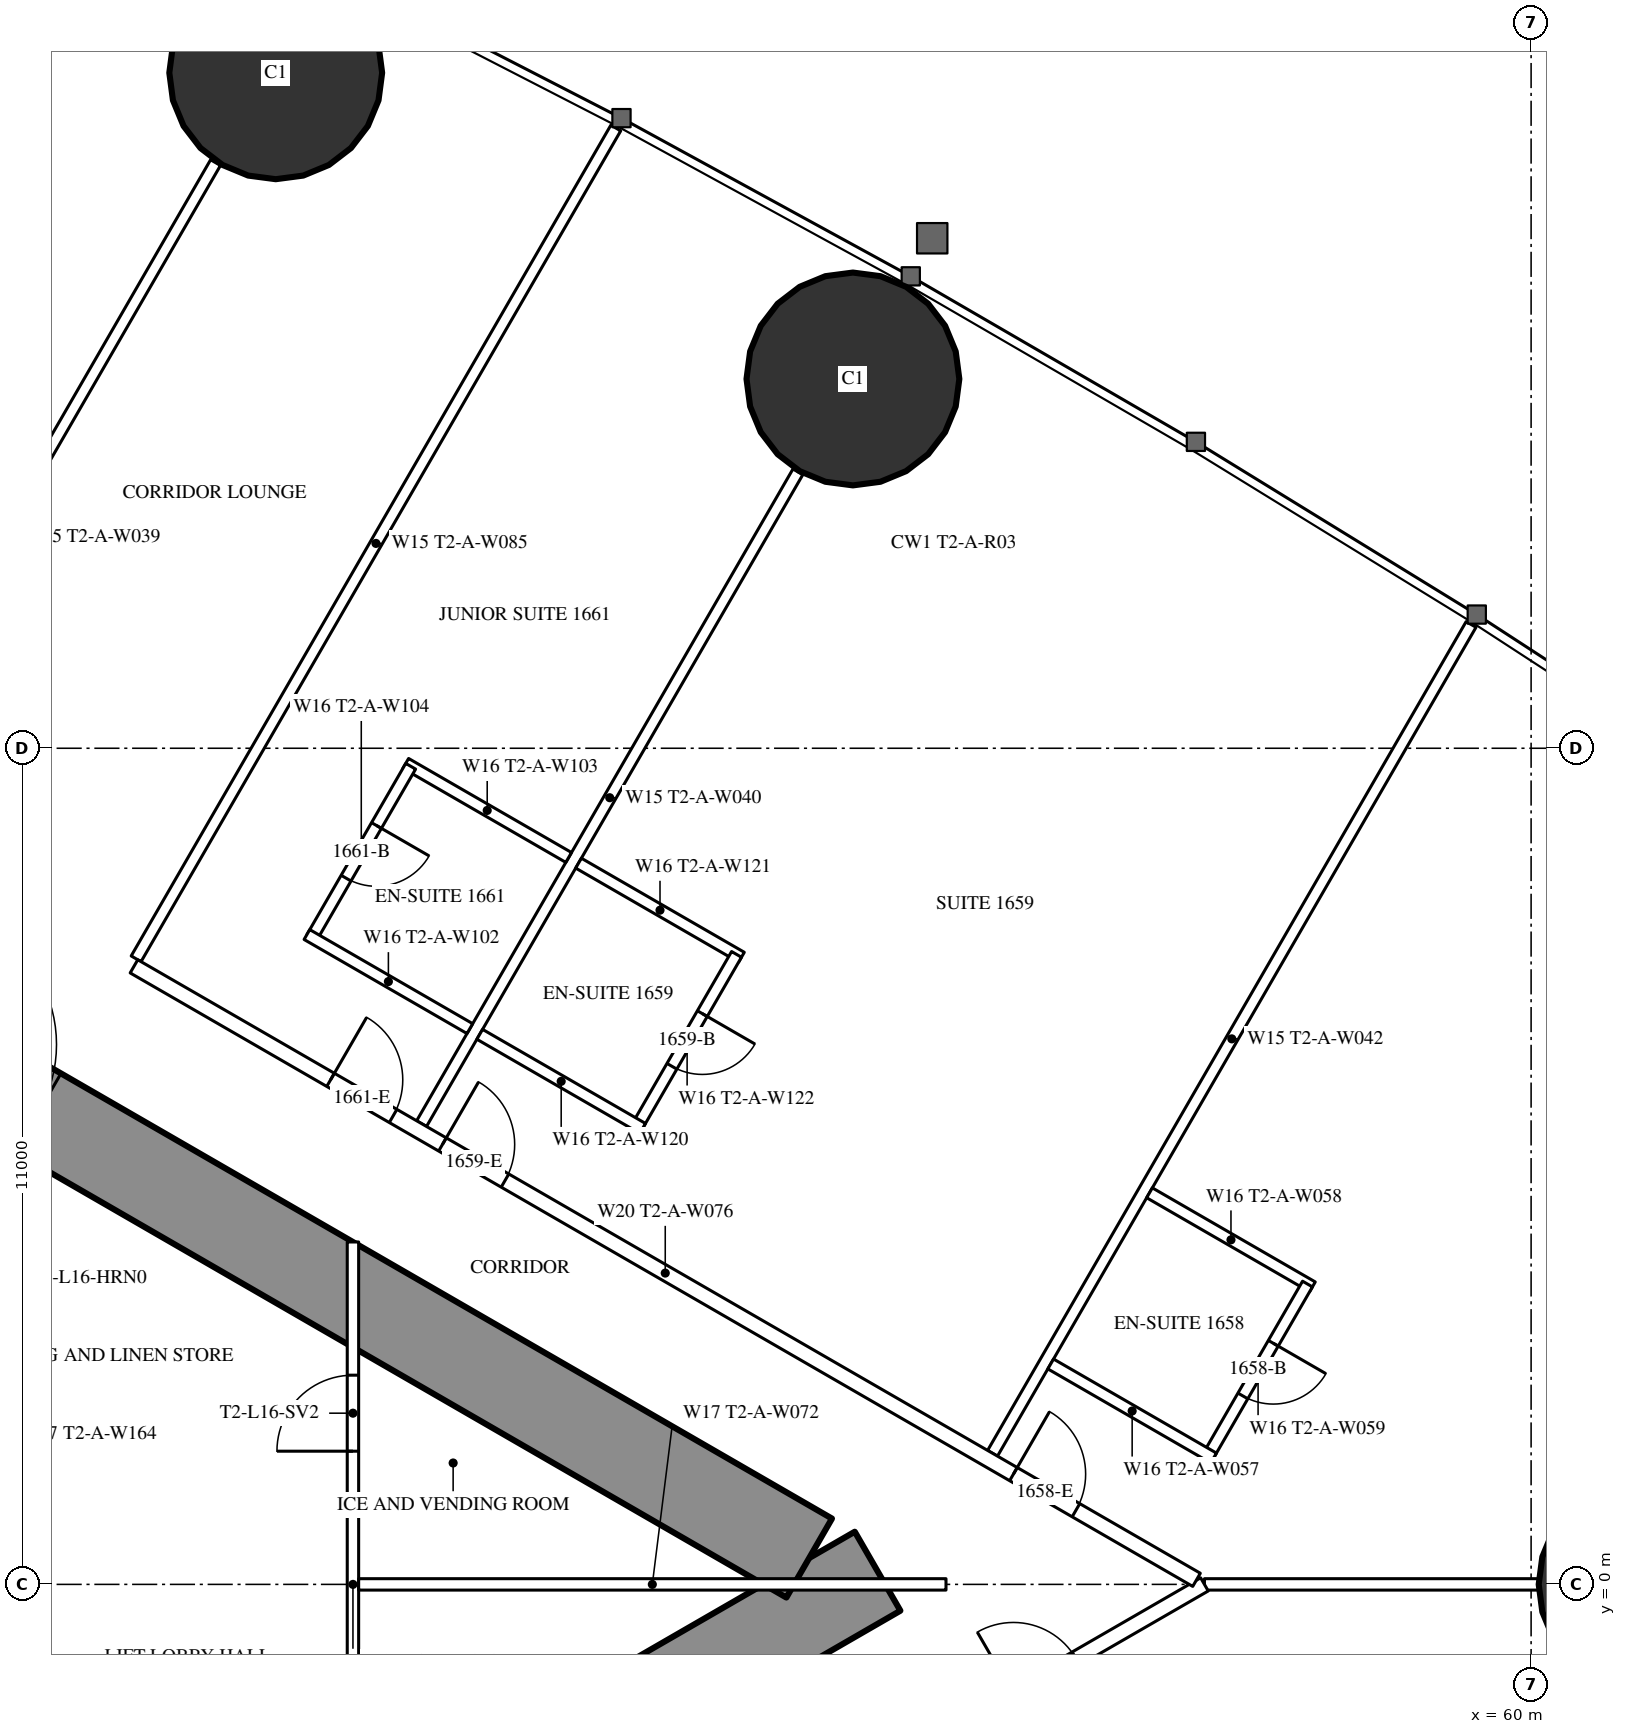
"""IFC4 building model, lengths in metres.
Left out: names, types, materials, properties, quantities, classifications, styles, units other than length and angle.
Written with IfcOpenShell. Run it as: python <this file> out.ifc"""

import sys

from ifc_helpers import new_model, si_unit, direction, frame, frame_2d, origin, origin_2d, place, context, subcontext, project, spatial, rectangle, hollow_circle, extrude, element, fill, save


model = new_model("IFC4")
c1 = context("Model", 3, precision=1e-05, world=origin(), true_north=direction((0.0, 1.0)))
c2 = subcontext(c1, "Body", "Model", "MODEL_VIEW")
j1 = project(units=[si_unit("LENGTHUNIT", "METRE"), si_unit("PLANEANGLEUNIT", "RADIAN")], contexts=[c1])
p1 = place(None, origin())
s1 = spatial("IfcSite", under=j1, at=p1, CompositionType="ELEMENT")
p2 = place(p1, origin())
s2 = spatial("IfcBuilding", under=s1, at=p2, CompositionType="ELEMENT")
p3 = place(p2, frame((0.0, 0.0, 63.5)))
s3 = spatial("IfcBuildingStorey", under=s2, at=p3, CompositionType="ELEMENT", Elevation=63.5)
for number, where, z_axis, x_axis in (
    (1, (51.078, 15.858, 0.0), (0.0, 0.0, 1.0), (1.0, 0.0, 0.0)),
    (2, (43.484, 19.886, 0.0), (0.0, 0.0, 1.0), (1.0, 0.0, 0.0)),
):
    element("IfcColumn", number, at=place(p3, frame(where, z_axis=z_axis, x_axis=x_axis)), inside=s3, PredefinedType="COLUMN", context=c2, shape_type="SweptSolid", body=[
        extrude(hollow_circle(Radius=1.4, WallThickness=0.12, at=origin_2d()), origin(), (0.0, 0.0, 1.0), 3.5),
    ])
p4 = place(p3, frame((61.5, 0.0, 0.0), z_axis=(0.0, 0.0, 1.0), x_axis=(1.0, 0.0, 0.0)))
e3 = element("IfcColumn", 3, at=p4, inside=s3, PredefinedType="COLUMN", context=c2, shape_type="SweptSolid", body=[
    extrude(hollow_circle(Radius=1.4, WallThickness=0.1, at=origin_2d()), origin(), (0.0, 0.0, 1.0), 3.5),
])
p5 = place(p3, frame((27.2, -13.8, 0.0), z_axis=(0.0, 0.0, 1.0), x_axis=(0.866027159892, 0.499996958321, 0.0)))
e4 = element("IfcWall", 4, at=p5, inside=s3, PredefinedType="SHEAR", context=c2, shape_type="SweptSolid", body=[
    extrude(rectangle(XDim=27.947, YDim=1.2, at=frame_2d((13.973, 0.0))), origin(), (0.0, 0.0, 1.0), 3.5),
])
p6 = place(p5, frame((4.6, 0.0, 0.0)))
e5 = element("IfcOpeningElement", 5, at=p6, cuts=e4, PredefinedType="OPENING", context=c2, shape_type="SweptSolid", body=[
    extrude(rectangle(XDim=1.0, YDim=2.2, at=frame_2d((0.5, 1.1))), frame((0.0, 0.61, 0.0), z_axis=(0.0, -1.0, 0.0), x_axis=(1.0, 0.0, 0.0)), (0.0, 0.0, 1.0), 1.22),
])
p7 = place(p5, frame((13.395, 0.0, 0.0)))
e6 = element("IfcOpeningElement", 6, at=p7, cuts=e4, PredefinedType="OPENING", context=c2, shape_type="SweptSolid", body=[
    extrude(rectangle(XDim=1.8, YDim=2.2, at=frame_2d((0.9, 1.1))), frame((0.0, 0.61, 0.0), z_axis=(0.0, -1.0, 0.0), x_axis=(1.0, 0.0, 0.0)), (0.0, 0.0, 1.0), 1.22),
])
p8 = place(p3, frame((27.2, 13.8, 0.0), z_axis=(0.0, 0.0, 1.0), x_axis=(0.866024515034, -0.500001539357, 0.0)))
e7 = element("IfcWall", 7, at=p8, inside=s3, PredefinedType="SHEAR", context=c2, shape_type="SweptSolid", body=[
    extrude(rectangle(XDim=26.907, YDim=1.2, at=frame_2d((13.454, 0.0))), origin(), (0.0, 0.0, 1.0), 3.5),
])
p9 = place(p8, frame((4.6, 0.0, 0.0)))
e8 = element("IfcOpeningElement", 8, at=p9, cuts=e7, PredefinedType="OPENING", context=c2, shape_type="SweptSolid", body=[
    extrude(rectangle(XDim=1.0, YDim=2.2, at=frame_2d((0.5, 1.1))), frame((0.0, 0.61, 0.0), z_axis=(0.0, -1.0, 0.0), x_axis=(1.0, 0.0, 0.0)), (0.0, 0.0, 1.0), 1.22),
])
p10 = place(p8, frame((13.395, 0.0, 0.0)))
e9 = element("IfcOpeningElement", 9, at=p10, cuts=e7, PredefinedType="OPENING", context=c2, shape_type="SweptSolid", body=[
    extrude(rectangle(XDim=1.8, YDim=2.2, at=frame_2d((0.9, 1.1))), frame((0.0, 0.61, 0.0), z_axis=(0.0, -1.0, 0.0), x_axis=(1.0, 0.0, 0.0)), (0.0, 0.0, 1.0), 1.22),
])
p11 = place(p3, frame((37.895, 10.396, 0.0), z_axis=(0.0, 0.0, 1.0), x_axis=(0.499995616528, 0.866027934568, 0.0)))
e10 = element("IfcWall", 10, at=p11, inside=s3, PredefinedType="PARTITIONING", context=c2, shape_type="SweptSolid", body=[
    extrude(rectangle(XDim=9.593, YDim=0.15, at=frame_2d((4.797, 0.0))), origin(), (0.0, 0.0, 1.0), 2.25),
])
p12 = place(p3, frame((41.647, 8.23, 0.0), z_axis=(0.0, 0.0, 1.0), x_axis=(0.49998590462, 0.866033541603, 0.0)))
e11 = element("IfcWall", 11, at=p12, inside=s3, PredefinedType="PARTITIONING", context=c2, shape_type="SweptSolid", body=[
    extrude(rectangle(XDim=12.621, YDim=0.15, at=frame_2d((6.311, 0.0))), origin(), (0.0, 0.0, 1.0), 3.25),
])
p13 = place(p3, frame((45.403, 6.062, 0.0), z_axis=(0.0, 0.0, 1.0), x_axis=(0.500013434677, 0.866017647131, 0.0)))
e12 = element("IfcWall", 12, at=p13, inside=s3, PredefinedType="PARTITIONING", context=c2, shape_type="SweptSolid", body=[
    extrude(rectangle(XDim=9.902, YDim=0.15, at=frame_2d((4.951, 0.0))), origin(), (0.0, 0.0, 1.0), 2.25),
])
p14 = place(p3, frame((52.915, 1.725, 0.0), z_axis=(0.0, 0.0, 1.0), x_axis=(0.499997163113, 0.866027041656, 0.0)))
e13 = element("IfcWall", 13, at=p14, inside=s3, PredefinedType="PARTITIONING", context=c2, shape_type="SweptSolid", body=[
    extrude(rectangle(XDim=12.591, YDim=0.15, at=frame_2d((6.295, 0.0))), origin(), (0.0, 0.0, 1.0), 3.25),
])
p15 = place(p3, frame((55.702, 0.0, 0.0), z_axis=(0.0, 0.0, 1.0), x_axis=(1.0, 0.0, 0.0)))
e14 = element("IfcWall", 14, at=p15, inside=s3, PredefinedType="PARTITIONING", context=c2, shape_type="SweptSolid", body=[
    extrude(rectangle(XDim=16.117, YDim=0.15, at=frame_2d((8.059, 0.0))), origin(), (0.0, 0.0, 1.0), 2.25),
])
p16 = place(p3, frame((37.96, -10.243, 0.0), z_axis=(0.0, 0.0, 1.0), x_axis=(0.866026429433, 0.499998223521, 0.0)))
e15 = element("IfcWall", 15, at=p16, inside=s3, PredefinedType="PARTITIONING", context=c2, shape_type="SweptSolid", body=[
    extrude(rectangle(XDim=20.487, YDim=0.2, at=frame_2d((10.243, 0.0))), origin(), (0.0, 0.0, 1.0), 3.25),
])
p17 = place(p16, frame((6.925, 0.0, 0.0)))
e16 = element("IfcOpeningElement", 16, at=p17, cuts=e15, PredefinedType="OPENING", context=c2, shape_type="SweptSolid", body=[
    extrude(rectangle(XDim=0.95, YDim=2.2, at=frame_2d((0.475, 1.1))), frame((0.0, 0.11, 0.0), z_axis=(0.0, -1.0, 0.0), x_axis=(1.0, 0.0, 0.0)), (0.0, 0.0, 1.0), 0.22),
])
p18 = place(p16, frame((8.912, 0.0, 0.0)))
e17 = element("IfcOpeningElement", 17, at=p18, cuts=e15, PredefinedType="OPENING", context=c2, shape_type="SweptSolid", body=[
    extrude(rectangle(XDim=0.95, YDim=2.2, at=frame_2d((0.475, 1.1))), frame((0.0, 0.11, 0.0), z_axis=(0.0, -1.0, 0.0), x_axis=(1.0, 0.0, 0.0)), (0.0, 0.0, 1.0), 0.22),
])
p19 = place(p16, frame((13.535, 0.0, 0.0)))
e18 = element("IfcOpeningElement", 18, at=p19, cuts=e15, PredefinedType="OPENING", context=c2, shape_type="SweptSolid", body=[
    extrude(rectangle(XDim=0.95, YDim=2.2, at=frame_2d((0.475, 1.1))), frame((0.0, 0.11, 0.0), z_axis=(0.0, -1.0, 0.0), x_axis=(1.0, 0.0, 0.0)), (0.0, 0.0, 1.0), 0.22),
])
p20 = place(p16, frame((17.585, 0.0, 0.0)))
e19 = element("IfcOpeningElement", 19, at=p20, cuts=e15, PredefinedType="OPENING", context=c2, shape_type="SweptSolid", body=[
    extrude(rectangle(XDim=0.95, YDim=2.2, at=frame_2d((0.475, 1.1))), frame((0.0, 0.11, 0.0), z_axis=(0.0, -1.0, 0.0), x_axis=(1.0, 0.0, 0.0)), (0.0, 0.0, 1.0), 0.22),
])
p21 = place(p16, frame((2.875, 0.0, 0.0)))
e20 = element("IfcOpeningElement", 20, at=p21, cuts=e15, PredefinedType="OPENING", context=c2, shape_type="SweptSolid", body=[
    extrude(rectangle(XDim=0.95, YDim=2.2, at=frame_2d((0.475, 1.1))), frame((0.0, 0.11, 0.0), z_axis=(0.0, -1.0, 0.0), x_axis=(1.0, 0.0, 0.0)), (0.0, 0.0, 1.0), 0.22),
])
p22 = place(p3, frame((41.619, 8.131, 0.0), z_axis=(0.0, 0.0, 1.0), x_axis=(0.86603245327, -0.499987789734, 0.0)))
e21 = element("IfcWall", 21, at=p22, inside=s3, PredefinedType="PARTITIONING", context=c2, shape_type="SweptSolid", body=[
    extrude(rectangle(XDim=16.142, YDim=0.2, at=frame_2d((8.071, 0.0))), origin(), (0.0, 0.0, 1.0), 3.25),
])
p23 = place(p22, frame((13.36, 0.0, 0.0)))
e22 = element("IfcOpeningElement", 22, at=p23, cuts=e21, PredefinedType="OPENING", context=c2, shape_type="SweptSolid", body=[
    extrude(rectangle(XDim=0.95, YDim=2.2, at=frame_2d((0.475, 1.1))), frame((0.0, 0.11, 0.0), z_axis=(0.0, -1.0, 0.0), x_axis=(1.0, 0.0, 0.0)), (0.0, 0.0, 1.0), 0.22),
])
p24 = place(p22, frame((4.687, 0.0, 0.0)))
e23 = element("IfcOpeningElement", 23, at=p24, cuts=e21, PredefinedType="OPENING", context=c2, shape_type="SweptSolid", body=[
    extrude(rectangle(XDim=0.95, YDim=2.2, at=frame_2d((0.475, 1.1))), frame((0.0, 0.11, 0.0), z_axis=(0.0, -1.0, 0.0), x_axis=(1.0, 0.0, 0.0)), (0.0, 0.0, 1.0), 0.22),
])
p25 = place(p22, frame((2.987, 0.0, 0.0)))
e24 = element("IfcOpeningElement", 24, at=p25, cuts=e21, PredefinedType="OPENING", context=c2, shape_type="SweptSolid", body=[
    extrude(rectangle(XDim=0.95, YDim=2.2, at=frame_2d((0.475, 1.1))), frame((0.0, 0.11, 0.0), z_axis=(0.0, -1.0, 0.0), x_axis=(1.0, 0.0, 0.0)), (0.0, 0.0, 1.0), 0.22),
])
p26 = place(p3, frame((54.98, 5.151, 0.0), z_axis=(0.0, 0.0, 1.0), x_axis=(0.86604923931, -0.499958713387, 0.0)))
e25 = element("IfcWall", 25, at=p26, inside=s3, PredefinedType="PARTITIONING", context=c2, shape_type="SweptSolid", body=[
    extrude(rectangle(XDim=2.475, YDim=0.15, at=frame_2d((1.237, 0.0))), origin(), (0.0, 0.0, 1.0), 3.25),
])
p27 = place(p3, frame((55.758, 1.7, 0.0), z_axis=(0.0, 0.0, 1.0), x_axis=(0.500006934395, 0.866021400173, 0.0)))
e26 = element("IfcWall", 26, at=p27, inside=s3, PredefinedType="PARTITIONING", context=c2, shape_type="SweptSolid", body=[
    extrude(rectangle(XDim=2.6, YDim=0.15, at=frame_2d((1.3, 0.0))), origin(), (0.0, 0.0, 1.0), 3.25),
])
p28 = place(p27, frame((0.9, 0.0, 0.0)))
e27 = element("IfcOpeningElement", 27, at=p28, cuts=e26, PredefinedType="OPENING", context=c2, shape_type="SweptSolid", body=[
    extrude(rectangle(XDim=0.8, YDim=2.2, at=frame_2d((0.4, 1.1))), frame((0.0, 0.085, 0.0), z_axis=(0.0, -1.0, 0.0), x_axis=(1.0, 0.0, 0.0)), (0.0, 0.0, 1.0), 0.17),
])
p29 = place(p3, frame((53.68, 2.9, 0.0), z_axis=(0.0, 0.0, 1.0), x_axis=(0.866006523861, -0.500032699561, 0.0)))
e28 = element("IfcWall", 28, at=p29, inside=s3, PredefinedType="PARTITIONING", context=c2, shape_type="SweptSolid", body=[
    extrude(rectangle(XDim=2.475, YDim=0.15, at=frame_2d((1.237, 0.0))), origin(), (0.0, 0.0, 1.0), 3.25),
])
p30 = place(p3, frame((47.468, 9.488, 0.0), z_axis=(0.0, 0.0, 1.0), x_axis=(0.866073894602, -0.499916002032, 0.0)))
e29 = element("IfcWall", 29, at=p30, inside=s3, PredefinedType="PARTITIONING", context=c2, shape_type="SweptSolid", body=[
    extrude(rectangle(XDim=2.475, YDim=0.15, at=frame_2d((1.238, 0.0))), origin(), (0.0, 0.0, 1.0), 3.25),
])
p31 = place(p3, frame((48.246, 6.037, 0.0), z_axis=(0.0, 0.0, 1.0), x_axis=(0.500006934395, 0.866021400173, 0.0)))
e30 = element("IfcWall", 30, at=p31, inside=s3, PredefinedType="PARTITIONING", context=c2, shape_type="SweptSolid", body=[
    extrude(rectangle(XDim=2.6, YDim=0.15, at=frame_2d((1.3, 0.0))), origin(), (0.0, 0.0, 1.0), 3.25),
])
p32 = place(p31, frame((0.9, 0.0, 0.0)))
e31 = element("IfcOpeningElement", 31, at=p32, cuts=e30, PredefinedType="OPENING", context=c2, shape_type="SweptSolid", body=[
    extrude(rectangle(XDim=0.8, YDim=2.2, at=frame_2d((0.4, 1.1))), frame((0.0, 0.085, 0.0), z_axis=(0.0, -1.0, 0.0), x_axis=(1.0, 0.0, 0.0)), (0.0, 0.0, 1.0), 0.17),
])
for number, where, z_axis, x_axis in (
    (32, (46.168, 7.237, 0.0), (0.0, 0.0, 1.0), (0.866, -0.5, 0.0)),
    (33, (45.195, 10.801, 0.0), (0.0, 0.0, 1.0), (0.866, -0.5, 0.0)),
):
    element("IfcWall", number, at=place(p3, frame(where, z_axis=z_axis, x_axis=x_axis)), inside=s3, PredefinedType="PARTITIONING", context=c2, shape_type="SweptSolid", body=[
        extrude(rectangle(XDim=2.475, YDim=0.15, at=frame_2d((1.237, 0.0))), origin(), (0.0, 0.0, 1.0), 3.25),
    ])
p33 = place(p3, frame((43.959, 8.512, 0.0), z_axis=(0.0, 0.0, 1.0), x_axis=(0.500006934395, 0.866021400173, 0.0)))
e34 = element("IfcWall", 34, at=p33, inside=s3, PredefinedType="PARTITIONING", context=c2, shape_type="SweptSolid", body=[
    extrude(rectangle(XDim=2.6, YDim=0.15, at=frame_2d((1.3, 0.0))), origin(), (0.0, 0.0, 1.0), 3.25),
])
p34 = place(p33, frame((0.9, 0.0, 0.0)))
e35 = element("IfcOpeningElement", 35, at=p34, cuts=e34, PredefinedType="OPENING", context=c2, shape_type="SweptSolid", body=[
    extrude(rectangle(XDim=0.8, YDim=2.2, at=frame_2d((0.4, 1.1))), frame((0.0, 0.085, 0.0), z_axis=(0.0, -1.0, 0.0), x_axis=(1.0, 0.0, 0.0)), (0.0, 0.0, 1.0), 0.17),
])
p35 = place(p3, frame((43.895, 8.549, 0.0), z_axis=(0.0, 0.0, 1.0), x_axis=(0.866031185235, -0.4999899861, 0.0)))
e36 = element("IfcWall", 36, at=p35, inside=s3, PredefinedType="PARTITIONING", context=c2, shape_type="SweptSolid", body=[
    extrude(rectangle(XDim=2.475, YDim=0.15, at=frame_2d((1.238, 0.0))), origin(), (0.0, 0.0, 1.0), 3.25),
])
p36 = place(p3, frame((44.5, -4.505, 0.0), z_axis=(0.0, 0.0, 1.0), x_axis=(0.0, 1.0, 0.0)))
e37 = element("IfcWall", 37, at=p36, inside=s3, PredefinedType="PARTITIONING", context=c2, shape_type="SweptSolid", body=[
    extrude(rectangle(XDim=9.009, YDim=0.15, at=frame_2d((4.505, 0.0))), origin(), (0.0, 0.0, 1.0), 2.45),
])
p37 = place(p36, frame((1.752, 0.0, 0.0)))
e38 = element("IfcOpeningElement", 38, at=p37, cuts=e37, PredefinedType="OPENING", context=c2, shape_type="SweptSolid", body=[
    extrude(rectangle(XDim=1.0, YDim=2.2, at=frame_2d((0.5, 1.1))), frame((0.0, 0.085, 0.0), z_axis=(0.0, -1.0, 0.0), x_axis=(1.0, 0.0, 0.0)), (0.0, 0.0, 1.0), 0.17),
])
p38 = place(p36, frame((6.257, 0.0, 0.0)))
e39 = element("IfcOpeningElement", 39, at=p38, cuts=e37, PredefinedType="OPENING", context=c2, shape_type="SweptSolid", body=[
    extrude(rectangle(XDim=1.0, YDim=2.2, at=frame_2d((0.5, 1.1))), frame((0.0, 0.085, 0.0), z_axis=(0.0, -1.0, 0.0), x_axis=(1.0, 0.0, 0.0)), (0.0, 0.0, 1.0), 0.17),
])
p39 = place(p3, frame((44.575, 0.0, 0.0), z_axis=(0.0, 0.0, 1.0), x_axis=(1.0, 0.0, 0.0)))
e40 = element("IfcWall", 40, at=p39, inside=s3, PredefinedType="PARTITIONING", context=c2, shape_type="SweptSolid", body=[
    extrude(rectangle(XDim=7.727, YDim=0.15, at=frame_2d((3.864, 0.0))), origin(), (0.0, 0.0, 1.0), 2.25),
])
p40 = place(p28, origin())
e41 = element("IfcDoor", 41, at=p40, inside=s3, OperationType="SINGLE_SWING_RIGHT", PredefinedType="DOOR", context=c2, shape_type="SweptSolid", body=[
    extrude(rectangle(XDim=0.8, YDim=2.2, at=frame_2d((0.4, 1.1))), frame((0.0, 0.025, 0.0), z_axis=(0.0, -1.0, 0.0), x_axis=(1.0, 0.0, 0.0)), (0.0, 0.0, 1.0), 0.05),
])
fill(e27, e41)
p41 = place(p23, origin())
e42 = element("IfcDoor", 42, at=p41, inside=s3, OperationType="SINGLE_SWING_LEFT", PredefinedType="DOOR", context=c2, shape_type="SweptSolid", body=[
    extrude(rectangle(XDim=0.95, YDim=2.2, at=frame_2d((0.475, 1.1))), frame((0.0, 0.025, 0.0), z_axis=(0.0, -1.0, 0.0), x_axis=(1.0, 0.0, 0.0)), (0.0, 0.0, 1.0), 0.05),
])
fill(e22, e42)
p42 = place(p32, origin())
e43 = element("IfcDoor", 43, at=p42, inside=s3, OperationType="SINGLE_SWING_RIGHT", PredefinedType="DOOR", context=c2, shape_type="SweptSolid", body=[
    extrude(rectangle(XDim=0.8, YDim=2.2, at=frame_2d((0.4, 1.1))), frame((0.0, 0.025, 0.0), z_axis=(0.0, -1.0, 0.0), x_axis=(1.0, 0.0, 0.0)), (0.0, 0.0, 1.0), 0.05),
])
fill(e31, e43)
p43 = place(p24, origin())
e44 = element("IfcDoor", 44, at=p43, inside=s3, OperationType="SINGLE_SWING_LEFT", PredefinedType="DOOR", context=c2, shape_type="SweptSolid", body=[
    extrude(rectangle(XDim=0.95, YDim=2.2, at=frame_2d((0.475, 1.1))), frame((0.0, 0.025, 0.0), z_axis=(0.0, -1.0, 0.0), x_axis=(1.0, 0.0, 0.0)), (0.0, 0.0, 1.0), 0.05),
])
fill(e23, e44)
p44 = place(p34, origin())
e45 = element("IfcDoor", 45, at=p44, inside=s3, OperationType="SINGLE_SWING_RIGHT", PredefinedType="DOOR", context=c2, shape_type="SweptSolid", body=[
    extrude(rectangle(XDim=0.8, YDim=2.2, at=frame_2d((0.4, 1.1))), frame((0.0, 0.025, 0.0), z_axis=(0.0, -1.0, 0.0), x_axis=(1.0, 0.0, 0.0)), (0.0, 0.0, 1.0), 0.05),
])
fill(e35, e45)
p45 = place(p25, origin())
e46 = element("IfcDoor", 46, at=p45, inside=s3, OperationType="SINGLE_SWING_LEFT", PredefinedType="DOOR", context=c2, shape_type="SweptSolid", body=[
    extrude(rectangle(XDim=0.95, YDim=2.2, at=frame_2d((0.475, 1.1))), frame((0.0, 0.025, 0.0), z_axis=(0.0, -1.0, 0.0), x_axis=(1.0, 0.0, 0.0)), (0.0, 0.0, 1.0), 0.05),
])
fill(e24, e46)
p46 = place(p38, origin())
e47 = element("IfcDoor", 47, at=p46, inside=s3, OperationType="SINGLE_SWING_LEFT", PredefinedType="DOOR", context=c2, shape_type="SweptSolid", body=[
    extrude(rectangle(XDim=1.0, YDim=2.2, at=frame_2d((0.5, 1.1))), frame((0.0, 0.025, 0.0), z_axis=(0.0, -1.0, 0.0), x_axis=(1.0, 0.0, 0.0)), (0.0, 0.0, 1.0), 0.05),
])
fill(e39, e47)
save(model, sys.argv[1])
